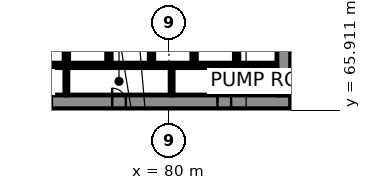
"""IFC4 building model, lengths in metres.
Left out: names, types, materials, properties, quantities, classifications, styles, units other than length and angle.
Written with IfcOpenShell. Run it as: python <this file> out.ifc"""

import sys

from ifc_helpers import new_model, si_unit, direction, frame, frame_2d, origin, place, context, subcontext, project, spatial, rectangle, extrude, element, fill, save


model = new_model("IFC4")
c1 = context("Model", 3, precision=1e-05, world=origin(), true_north=direction((0.0, 1.0)))
c2 = subcontext(c1, "Body", "Model", "MODEL_VIEW")
j1 = project(units=[si_unit("LENGTHUNIT", "METRE"), si_unit("PLANEANGLEUNIT", "RADIAN")], contexts=[c1])
p1 = place(None, origin())
s1 = spatial("IfcSite", under=j1, at=p1, CompositionType="ELEMENT")
p2 = place(p1, origin())
s2 = spatial("IfcBuilding", under=s1, at=p2, CompositionType="ELEMENT")
p3 = place(p2, origin())
s3 = spatial("IfcBuildingStorey", under=s2, at=p3, CompositionType="ELEMENT", Elevation=0.0)
p4 = place(p3, frame((62.0, 66.45, 0.0), z_axis=(0.0, 0.0, 1.0), x_axis=(1.0, 0.0, 0.0)))
e1 = element("IfcWall", 1, at=p4, inside=s3, PredefinedType="SHEAR", context=c2, shape_type="SweptSolid", body=[
    extrude(rectangle(XDim=26.0, YDim=0.9, at=frame_2d((13.0, 0.0))), origin(), (0.0, 0.0, 1.0), 7.7),
])
p5 = place(p4, frame((3.45, 0.0, 0.0)))
e2 = element("IfcOpeningElement", 2, at=p5, cuts=e1, PredefinedType="OPENING", context=c2, shape_type="SweptSolid", body=[
    extrude(rectangle(XDim=0.9, YDim=2.1, at=frame_2d((0.45, 1.05))), frame((0.0, 0.46, 0.0), z_axis=(0.0, -1.0, 0.0), x_axis=(1.0, 0.0, 0.0)), (0.0, 0.0, 1.0), 0.92),
])
p6 = place(p4, frame((6.425, 0.0, 0.0)))
e3 = element("IfcOpeningElement", 3, at=p6, cuts=e1, PredefinedType="OPENING", context=c2, shape_type="SweptSolid", body=[
    extrude(rectangle(XDim=0.9, YDim=2.1, at=frame_2d((0.45, 1.05))), frame((0.0, 0.46, 0.0), z_axis=(0.0, -1.0, 0.0), x_axis=(1.0, 0.0, 0.0)), (0.0, 0.0, 1.0), 0.92),
])
p7 = place(p4, frame((9.4, 0.0, 0.0)))
e4 = element("IfcOpeningElement", 4, at=p7, cuts=e1, PredefinedType="OPENING", context=c2, shape_type="SweptSolid", body=[
    extrude(rectangle(XDim=0.9, YDim=2.1, at=frame_2d((0.45, 1.05))), frame((0.0, 0.46, 0.0), z_axis=(0.0, -1.0, 0.0), x_axis=(1.0, 0.0, 0.0)), (0.0, 0.0, 1.0), 0.92),
])
p8 = place(p4, frame((14.262, 0.0, 0.0)))
e5 = element("IfcOpeningElement", 5, at=p8, cuts=e1, PredefinedType="OPENING", context=c2, shape_type="SweptSolid", body=[
    extrude(rectangle(XDim=0.9, YDim=2.1, at=frame_2d((0.45, 1.05))), frame((0.0, 0.46, 0.0), z_axis=(0.0, -1.0, 0.0), x_axis=(1.0, 0.0, 0.0)), (0.0, 0.0, 1.0), 0.92),
])
p9 = place(p4, frame((21.188, 0.0, 0.0)))
e6 = element("IfcOpeningElement", 6, at=p9, cuts=e1, PredefinedType="OPENING", context=c2, shape_type="SweptSolid", body=[
    extrude(rectangle(XDim=0.9, YDim=2.1, at=frame_2d((0.45, 1.05))), frame((0.0, 0.46, 0.0), z_axis=(0.0, -1.0, 0.0), x_axis=(1.0, 0.0, 0.0)), (0.0, 0.0, 1.0), 0.92),
])
p10 = place(p3, frame((87.55, 66.9, 0.0), z_axis=(0.0, 0.0, 1.0), x_axis=(0.0, 1.0, 0.0)))
e7 = element("IfcWall", 7, at=p10, inside=s3, PredefinedType="SHEAR", context=c2, shape_type="SweptSolid", body=[
    extrude(rectangle(XDim=16.2, YDim=0.9, at=frame_2d((8.1, 0.0))), origin(), (0.0, 0.0, 1.0), 7.7),
])
p11 = place(p10, frame((5.5, 0.0, 0.0)))
e8 = element("IfcOpeningElement", 8, at=p11, cuts=e7, PredefinedType="OPENING", context=c2, shape_type="SweptSolid", body=[
    extrude(rectangle(XDim=1.8, YDim=2.1, at=frame_2d((0.9, 1.05))), frame((0.0, 0.46, 0.0), z_axis=(0.0, -1.0, 0.0), x_axis=(1.0, 0.0, 0.0)), (0.0, 0.0, 1.0), 0.92),
])
p12 = place(p10, frame((11.738, 0.0, 0.0)))
e9 = element("IfcOpeningElement", 9, at=p12, cuts=e7, PredefinedType="OPENING", context=c2, shape_type="SweptSolid", body=[
    extrude(rectangle(XDim=0.9, YDim=2.1, at=frame_2d((0.45, 1.05))), frame((0.0, 0.46, 0.0), z_axis=(0.0, -1.0, 0.0), x_axis=(1.0, 0.0, 0.0)), (0.0, 0.0, 1.0), 0.92),
])
p13 = place(p3, frame((70.35, 68.85, 0.0), z_axis=(0.0, 0.0, 1.0), x_axis=(1.0, 0.0, 0.0)))
e10 = element("IfcWall", 10, at=p13, inside=s3, PredefinedType="SHEAR", context=c2, shape_type="SweptSolid", body=[
    extrude(rectangle(XDim=16.75, YDim=0.3, at=frame_2d((8.375, 0.0))), origin(), (0.0, 0.0, 1.0), 7.7),
])
for number, where, z_axis, x_axis in (
    (11, (73.25, 69.0, 0.0), (0.0, 0.0, 1.0), (0.0, 1.0, 0.0)),
    (12, (76.05, 69.0, 0.0), (0.0, 0.0, 1.0), (0.0, 1.0, 0.0)),
    (13, (78.85, 69.0, 0.0), (0.0, 0.0, 1.0), (0.0, 1.0, 0.0)),
    (14, (81.65, 69.0, 0.0), (0.0, 0.0, 1.0), (0.0, 1.0, 0.0)),
    (15, (84.45, 69.0, 0.0), (0.0, 0.0, 1.0), (0.0, 1.0, 0.0)),
):
    element("IfcWall", number, at=place(p3, frame(where, z_axis=z_axis, x_axis=x_axis)), inside=s3, PredefinedType="SHEAR", context=c2, shape_type="SweptSolid", body=[
        extrude(rectangle(XDim=2.6, YDim=0.3, at=frame_2d((1.3, 0.0))), origin(), (0.0, 0.0, 1.0), 7.7),
    ])
p14 = place(p3, frame((107.504, 60.451, 0.0), z_axis=(0.0, 0.0, 1.0), x_axis=(-0.500000550228, 0.86602508611, 0.0)))
e16 = element("IfcWall", 16, at=p14, inside=s3, PredefinedType="SOLIDWALL", context=c2, shape_type="SweptSolid", body=[
    extrude(rectangle(XDim=57.704, YDim=0.3, at=frame_2d((28.852, 0.0))), origin(), (0.0, 0.0, 1.0), 7.7),
])
p15 = place(p14, frame((56.104, 0.0, 0.0)))
e17 = element("IfcOpeningElement", 17, at=p15, cuts=e16, PredefinedType="OPENING", context=c2, shape_type="SweptSolid", body=[
    extrude(rectangle(XDim=1.2, YDim=2.4, at=frame_2d((0.6, 1.2))), frame((0.0, 0.16, 0.0), z_axis=(0.0, -1.0, 0.0), x_axis=(1.0, 0.0, 0.0)), (0.0, 0.0, 1.0), 0.32),
])
p16 = place(p14, frame((1.552, 0.0, 0.15)))
e18 = element("IfcOpeningElement", 18, at=p16, cuts=e16, PredefinedType="OPENING", context=c2, shape_type="SweptSolid", body=[
    extrude(rectangle(XDim=2.1, YDim=5.4, at=frame_2d((1.05, 2.7))), frame((0.0, 0.16, 0.0), z_axis=(0.0, -1.0, 0.0), x_axis=(1.0, 0.0, 0.0)), (0.0, 0.0, 1.0), 0.32),
])
p17 = place(p14, frame((4.052, 0.0, 0.15)))
e19 = element("IfcOpeningElement", 19, at=p17, cuts=e16, PredefinedType="OPENING", context=c2, shape_type="SweptSolid", body=[
    extrude(rectangle(XDim=2.1, YDim=5.4, at=frame_2d((1.05, 2.7))), frame((0.0, 0.16, 0.0), z_axis=(0.0, -1.0, 0.0), x_axis=(1.0, 0.0, 0.0)), (0.0, 0.0, 1.0), 0.32),
])
p18 = place(p14, frame((6.552, 0.0, 0.15)))
e20 = element("IfcOpeningElement", 20, at=p18, cuts=e16, PredefinedType="OPENING", context=c2, shape_type="SweptSolid", body=[
    extrude(rectangle(XDim=2.1, YDim=5.4, at=frame_2d((1.05, 2.7))), frame((0.0, 0.16, 0.0), z_axis=(0.0, -1.0, 0.0), x_axis=(1.0, 0.0, 0.0)), (0.0, 0.0, 1.0), 0.32),
])
p19 = place(p14, frame((9.052, 0.0, 0.15)))
e21 = element("IfcOpeningElement", 21, at=p19, cuts=e16, PredefinedType="OPENING", context=c2, shape_type="SweptSolid", body=[
    extrude(rectangle(XDim=2.1, YDim=5.4, at=frame_2d((1.05, 2.7))), frame((0.0, 0.16, 0.0), z_axis=(0.0, -1.0, 0.0), x_axis=(1.0, 0.0, 0.0)), (0.0, 0.0, 1.0), 0.32),
])
p20 = place(p14, frame((11.552, 0.0, 0.15)))
e22 = element("IfcOpeningElement", 22, at=p20, cuts=e16, PredefinedType="OPENING", context=c2, shape_type="SweptSolid", body=[
    extrude(rectangle(XDim=2.1, YDim=5.4, at=frame_2d((1.05, 2.7))), frame((0.0, 0.16, 0.0), z_axis=(0.0, -1.0, 0.0), x_axis=(1.0, 0.0, 0.0)), (0.0, 0.0, 1.0), 0.32),
])
p21 = place(p14, frame((14.052, 0.0, 0.15)))
e23 = element("IfcOpeningElement", 23, at=p21, cuts=e16, PredefinedType="OPENING", context=c2, shape_type="SweptSolid", body=[
    extrude(rectangle(XDim=2.1, YDim=5.4, at=frame_2d((1.05, 2.7))), frame((0.0, 0.16, 0.0), z_axis=(0.0, -1.0, 0.0), x_axis=(1.0, 0.0, 0.0)), (0.0, 0.0, 1.0), 0.32),
])
p22 = place(p14, frame((16.552, 0.0, 0.15)))
e24 = element("IfcOpeningElement", 24, at=p22, cuts=e16, PredefinedType="OPENING", context=c2, shape_type="SweptSolid", body=[
    extrude(rectangle(XDim=2.1, YDim=5.4, at=frame_2d((1.05, 2.7))), frame((0.0, 0.16, 0.0), z_axis=(0.0, -1.0, 0.0), x_axis=(1.0, 0.0, 0.0)), (0.0, 0.0, 1.0), 0.32),
])
p23 = place(p14, frame((19.052, 0.0, 0.15)))
e25 = element("IfcOpeningElement", 25, at=p23, cuts=e16, PredefinedType="OPENING", context=c2, shape_type="SweptSolid", body=[
    extrude(rectangle(XDim=2.1, YDim=5.4, at=frame_2d((1.05, 2.7))), frame((0.0, 0.16, 0.0), z_axis=(0.0, -1.0, 0.0), x_axis=(1.0, 0.0, 0.0)), (0.0, 0.0, 1.0), 0.32),
])
p24 = place(p14, frame((21.552, 0.0, 0.15)))
e26 = element("IfcOpeningElement", 26, at=p24, cuts=e16, PredefinedType="OPENING", context=c2, shape_type="SweptSolid", body=[
    extrude(rectangle(XDim=2.1, YDim=5.4, at=frame_2d((1.05, 2.7))), frame((0.0, 0.16, 0.0), z_axis=(0.0, -1.0, 0.0), x_axis=(1.0, 0.0, 0.0)), (0.0, 0.0, 1.0), 0.32),
])
p25 = place(p14, frame((24.052, 0.0, 0.15)))
e27 = element("IfcOpeningElement", 27, at=p25, cuts=e16, PredefinedType="OPENING", context=c2, shape_type="SweptSolid", body=[
    extrude(rectangle(XDim=2.1, YDim=5.4, at=frame_2d((1.05, 2.7))), frame((0.0, 0.16, 0.0), z_axis=(0.0, -1.0, 0.0), x_axis=(1.0, 0.0, 0.0)), (0.0, 0.0, 1.0), 0.32),
])
p26 = place(p14, frame((26.552, 0.0, 0.15)))
e28 = element("IfcOpeningElement", 28, at=p26, cuts=e16, PredefinedType="OPENING", context=c2, shape_type="SweptSolid", body=[
    extrude(rectangle(XDim=2.1, YDim=5.4, at=frame_2d((1.05, 2.7))), frame((0.0, 0.16, 0.0), z_axis=(0.0, -1.0, 0.0), x_axis=(1.0, 0.0, 0.0)), (0.0, 0.0, 1.0), 0.32),
])
p27 = place(p14, frame((29.052, 0.0, 0.15)))
e29 = element("IfcOpeningElement", 29, at=p27, cuts=e16, PredefinedType="OPENING", context=c2, shape_type="SweptSolid", body=[
    extrude(rectangle(XDim=2.1, YDim=5.4, at=frame_2d((1.05, 2.7))), frame((0.0, 0.16, 0.0), z_axis=(0.0, -1.0, 0.0), x_axis=(1.0, 0.0, 0.0)), (0.0, 0.0, 1.0), 0.32),
])
p28 = place(p14, frame((31.552, 0.0, 0.15)))
e30 = element("IfcOpeningElement", 30, at=p28, cuts=e16, PredefinedType="OPENING", context=c2, shape_type="SweptSolid", body=[
    extrude(rectangle(XDim=2.1, YDim=5.4, at=frame_2d((1.05, 2.7))), frame((0.0, 0.16, 0.0), z_axis=(0.0, -1.0, 0.0), x_axis=(1.0, 0.0, 0.0)), (0.0, 0.0, 1.0), 0.32),
])
p29 = place(p14, frame((34.052, 0.0, 0.15)))
e31 = element("IfcOpeningElement", 31, at=p29, cuts=e16, PredefinedType="OPENING", context=c2, shape_type="SweptSolid", body=[
    extrude(rectangle(XDim=2.1, YDim=5.4, at=frame_2d((1.05, 2.7))), frame((0.0, 0.16, 0.0), z_axis=(0.0, -1.0, 0.0), x_axis=(1.0, 0.0, 0.0)), (0.0, 0.0, 1.0), 0.32),
])
p30 = place(p14, frame((36.552, 0.0, 0.15)))
e32 = element("IfcOpeningElement", 32, at=p30, cuts=e16, PredefinedType="OPENING", context=c2, shape_type="SweptSolid", body=[
    extrude(rectangle(XDim=2.1, YDim=5.4, at=frame_2d((1.05, 2.7))), frame((0.0, 0.16, 0.0), z_axis=(0.0, -1.0, 0.0), x_axis=(1.0, 0.0, 0.0)), (0.0, 0.0, 1.0), 0.32),
])
p31 = place(p14, frame((39.052, 0.0, 0.15)))
e33 = element("IfcOpeningElement", 33, at=p31, cuts=e16, PredefinedType="OPENING", context=c2, shape_type="SweptSolid", body=[
    extrude(rectangle(XDim=2.1, YDim=5.4, at=frame_2d((1.05, 2.7))), frame((0.0, 0.16, 0.0), z_axis=(0.0, -1.0, 0.0), x_axis=(1.0, 0.0, 0.0)), (0.0, 0.0, 1.0), 0.32),
])
p32 = place(p14, frame((41.552, 0.0, 0.15)))
e34 = element("IfcOpeningElement", 34, at=p32, cuts=e16, PredefinedType="OPENING", context=c2, shape_type="SweptSolid", body=[
    extrude(rectangle(XDim=2.1, YDim=5.4, at=frame_2d((1.05, 2.7))), frame((0.0, 0.16, 0.0), z_axis=(0.0, -1.0, 0.0), x_axis=(1.0, 0.0, 0.0)), (0.0, 0.0, 1.0), 0.32),
])
p33 = place(p14, frame((44.052, 0.0, 0.15)))
e35 = element("IfcOpeningElement", 35, at=p33, cuts=e16, PredefinedType="OPENING", context=c2, shape_type="SweptSolid", body=[
    extrude(rectangle(XDim=2.1, YDim=5.4, at=frame_2d((1.05, 2.7))), frame((0.0, 0.16, 0.0), z_axis=(0.0, -1.0, 0.0), x_axis=(1.0, 0.0, 0.0)), (0.0, 0.0, 1.0), 0.32),
])
p34 = place(p14, frame((46.552, 0.0, 0.15)))
e36 = element("IfcOpeningElement", 36, at=p34, cuts=e16, PredefinedType="OPENING", context=c2, shape_type="SweptSolid", body=[
    extrude(rectangle(XDim=2.1, YDim=5.4, at=frame_2d((1.05, 2.7))), frame((0.0, 0.16, 0.0), z_axis=(0.0, -1.0, 0.0), x_axis=(1.0, 0.0, 0.0)), (0.0, 0.0, 1.0), 0.32),
])
p35 = place(p14, frame((49.052, 0.0, 0.15)))
e37 = element("IfcOpeningElement", 37, at=p35, cuts=e16, PredefinedType="OPENING", context=c2, shape_type="SweptSolid", body=[
    extrude(rectangle(XDim=2.1, YDim=5.4, at=frame_2d((1.05, 2.7))), frame((0.0, 0.16, 0.0), z_axis=(0.0, -1.0, 0.0), x_axis=(1.0, 0.0, 0.0)), (0.0, 0.0, 1.0), 0.32),
])
p36 = place(p14, frame((51.552, 0.0, 0.15)))
e38 = element("IfcOpeningElement", 38, at=p36, cuts=e16, PredefinedType="OPENING", context=c2, shape_type="SweptSolid", body=[
    extrude(rectangle(XDim=2.1, YDim=5.4, at=frame_2d((1.05, 2.7))), frame((0.0, 0.16, 0.0), z_axis=(0.0, -1.0, 0.0), x_axis=(1.0, 0.0, 0.0)), (0.0, 0.0, 1.0), 0.32),
])
for number, where, z_axis, x_axis in (
    (39, (73.25, 66.9, 0.0), (0.0, 0.0, 1.0), (0.0, 1.0, 0.0)),
    (40, (80.175, 66.9, 0.0), (0.0, 0.0, 1.0), (0.0, 1.0, 0.0)),
):
    element("IfcWall", number, at=place(p3, frame(where, z_axis=z_axis, x_axis=x_axis)), inside=s3, PredefinedType="PARTITIONING", context=c2, shape_type="SweptSolid", body=[
        extrude(rectangle(XDim=1.8, YDim=0.2, at=frame_2d((0.9, 0.0))), origin(), (0.0, 0.0, 1.0), 7.7),
    ])
p37 = place(p3, frame((107.106, 62.36, 0.0), z_axis=(0.0, 0.0, 1.0), x_axis=(-0.49999992739, 0.866025445706, 0.0)))
e41 = element("IfcWall", 41, at=p37, inside=s3, PredefinedType="SOLIDWALL", context=c2, shape_type="SweptSolid", body=[
    extrude(rectangle(XDim=54.0, YDim=0.4, at=frame_2d((27.0, 0.0))), origin(), (0.0, 0.0, 1.0), 7.64),
])
p38 = place(p3, frame((112.456, 65.794, 0.0), z_axis=(0.0, 0.0, 1.0), x_axis=(-0.499998559706, 0.866026235337, 0.0)))
e42 = element("IfcWall", 42, at=p38, inside=s3, PredefinedType="PARTITIONING", context=c2, shape_type="SweptSolid", body=[
    extrude(rectangle(XDim=53.4, YDim=0.2, at=frame_2d((26.7, 0.0))), origin(), (0.0, 0.0, 1.0), 7.64),
])
p39 = place(p38, frame((12.6, 0.0, 0.0)))
e43 = element("IfcOpeningElement", 43, at=p39, cuts=e42, PredefinedType="OPENING", context=c2, shape_type="SweptSolid", body=[
    extrude(rectangle(XDim=1.8, YDim=2.1, at=frame_2d((0.9, 1.05))), frame((0.0, 0.11, 0.0), z_axis=(0.0, -1.0, 0.0), x_axis=(1.0, 0.0, 0.0)), (0.0, 0.0, 1.0), 0.22),
])
p40 = place(p38, frame((25.8, 0.0, 0.0)))
e44 = element("IfcOpeningElement", 44, at=p40, cuts=e42, PredefinedType="OPENING", context=c2, shape_type="SweptSolid", body=[
    extrude(rectangle(XDim=1.8, YDim=2.1, at=frame_2d((0.9, 1.05))), frame((0.0, 0.11, 0.0), z_axis=(0.0, -1.0, 0.0), x_axis=(1.0, 0.0, 0.0)), (0.0, 0.0, 1.0), 0.22),
])
p41 = place(p38, frame((35.0, 0.0, 0.0)))
e45 = element("IfcOpeningElement", 45, at=p41, cuts=e42, PredefinedType="OPENING", context=c2, shape_type="SweptSolid", body=[
    extrude(rectangle(XDim=1.0, YDim=2.1, at=frame_2d((0.5, 1.05))), frame((0.0, 0.11, 0.0), z_axis=(0.0, -1.0, 0.0), x_axis=(1.0, 0.0, 0.0)), (0.0, 0.0, 1.0), 0.22),
])
p42 = place(p38, frame((45.75, 0.0, 0.0)))
e46 = element("IfcOpeningElement", 46, at=p42, cuts=e42, PredefinedType="OPENING", context=c2, shape_type="SweptSolid", body=[
    extrude(rectangle(XDim=1.8, YDim=2.1, at=frame_2d((0.9, 1.05))), frame((0.0, 0.11, 0.0), z_axis=(0.0, -1.0, 0.0), x_axis=(1.0, 0.0, 0.0)), (0.0, 0.0, 1.0), 0.22),
])
p43 = place(p8, origin())
e47 = element("IfcDoor", 47, at=p43, inside=s3, OperationType="SINGLE_SWING_RIGHT", PredefinedType="DOOR", context=c2, shape_type="SweptSolid", body=[
    extrude(rectangle(XDim=0.9, YDim=2.1, at=frame_2d((0.45, 1.05))), frame((0.0, 0.17, 0.0), z_axis=(0.0, -1.0, 0.0), x_axis=(1.0, 0.0, 0.0)), (0.0, 0.0, 1.0), 0.34),
])
fill(e5, e47)
p44 = place(p9, origin())
e48 = element("IfcDoor", 48, at=p44, inside=s3, OperationType="SINGLE_SWING_LEFT", PredefinedType="DOOR", context=c2, shape_type="SweptSolid", body=[
    extrude(rectangle(XDim=0.9, YDim=2.1, at=frame_2d((0.45, 1.05))), frame((0.0, 0.17, 0.0), z_axis=(0.0, -1.0, 0.0), x_axis=(1.0, 0.0, 0.0)), (0.0, 0.0, 1.0), 0.34),
])
fill(e6, e48)
save(model, sys.argv[1])
